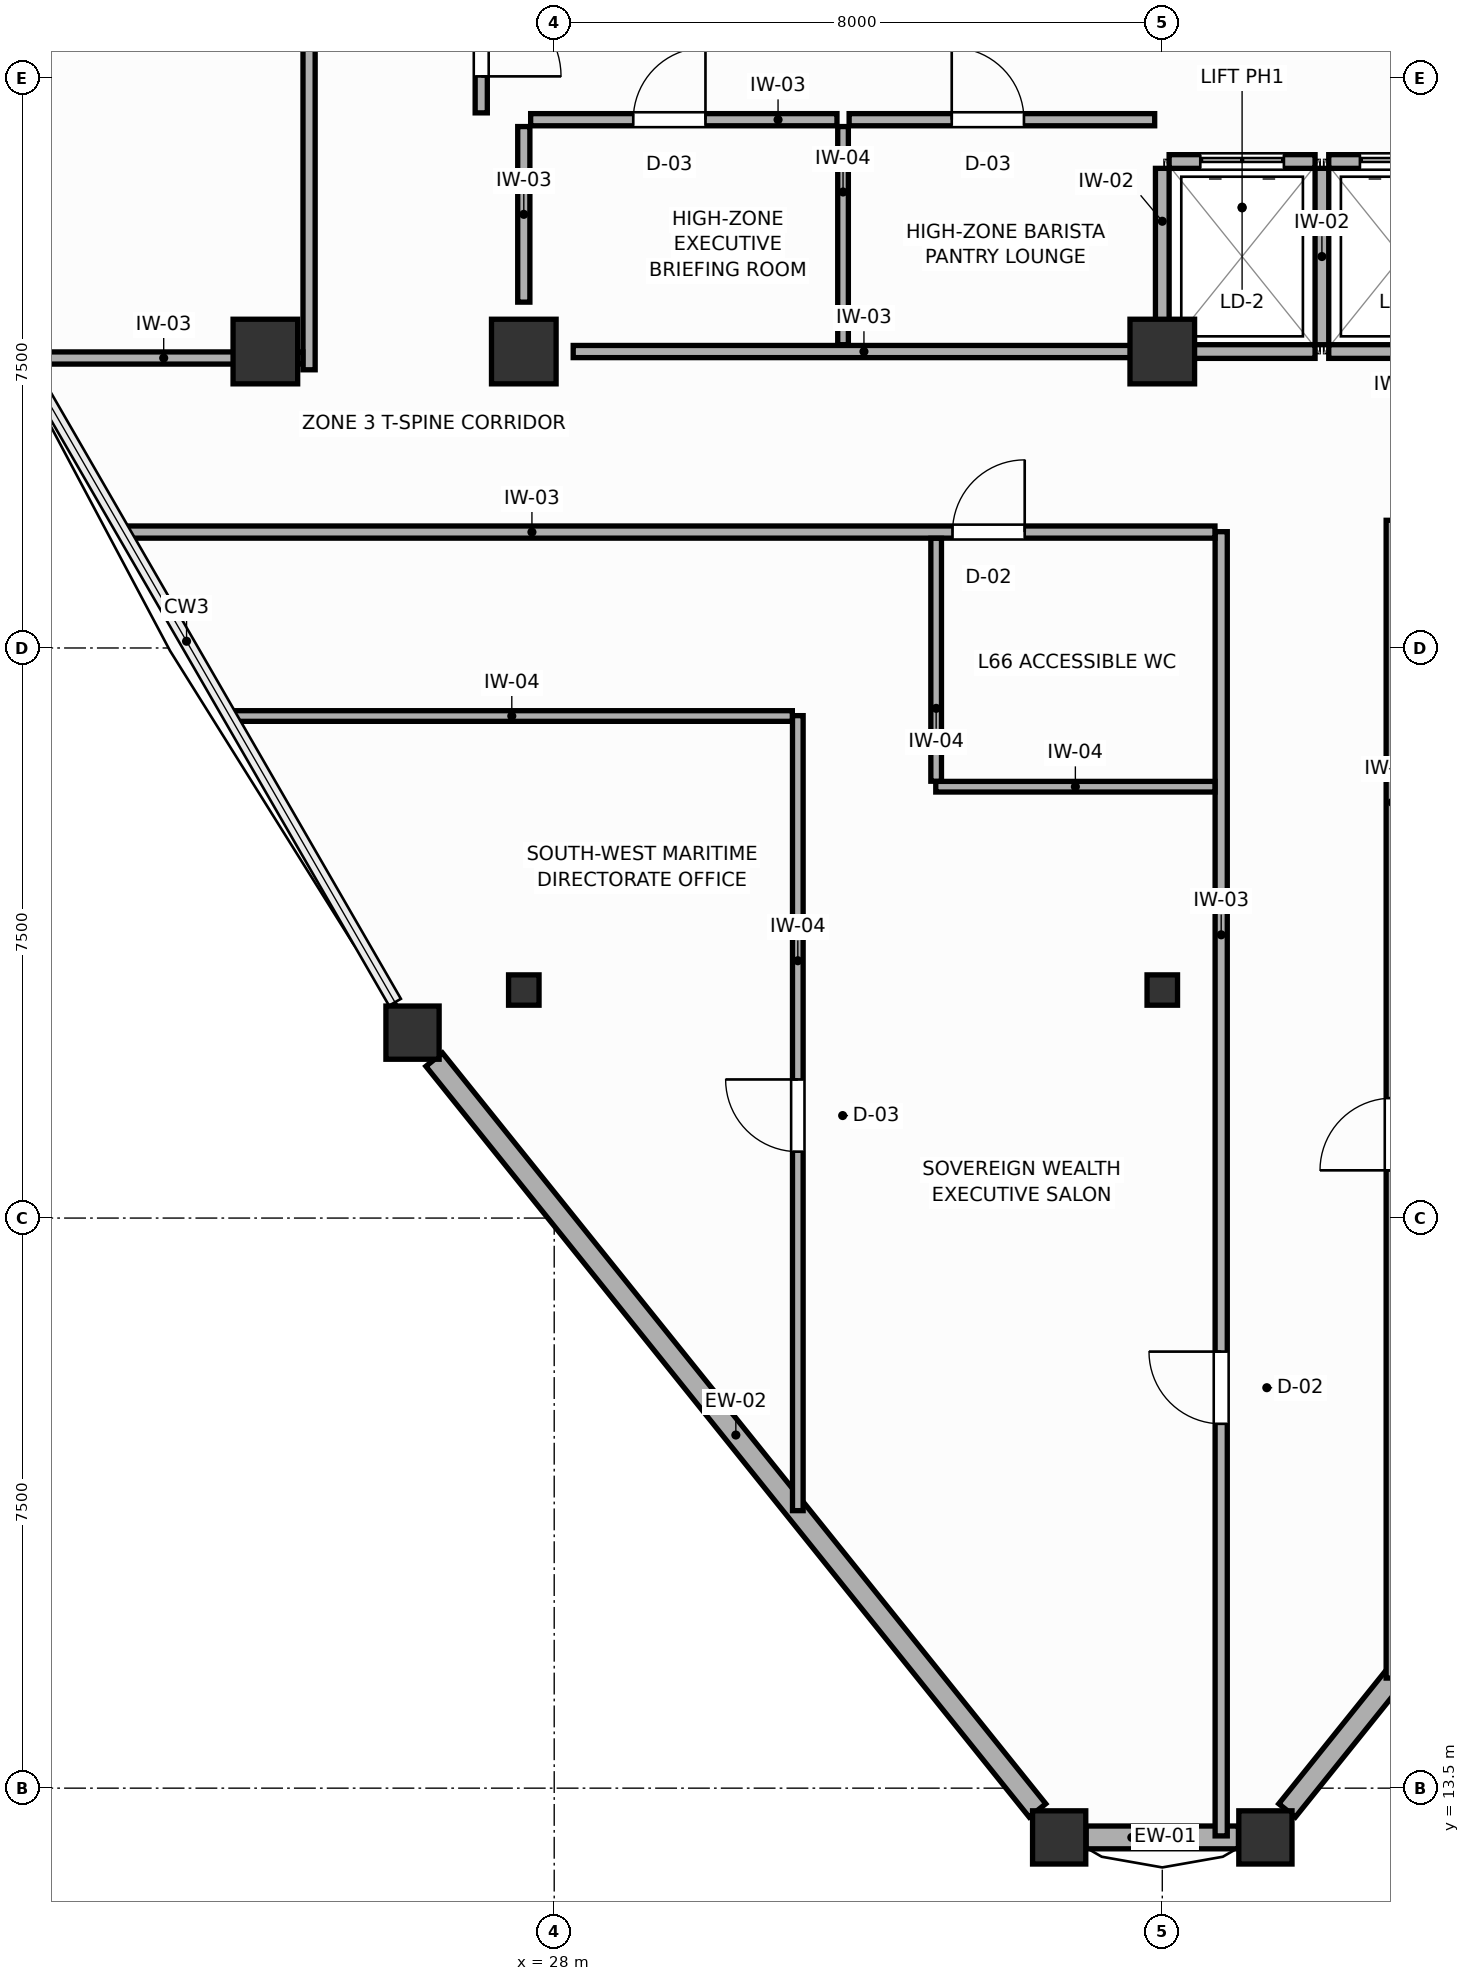
"""IFC4 building model, lengths in metres.
Left out: names, types, materials, properties, quantities, classifications, styles, units other than length and angle.
Written with IfcOpenShell. Run it as: python <this file> out.ifc"""

import sys

from ifc_helpers import new_model, si_unit, direction, frame, frame_2d, origin, origin_2d, place, context, subcontext, project, spatial, rectangle, i_section, extrude, source, transform, mapped, element, fill, save


model = new_model("IFC4")
c1 = context("Model", 3, precision=1e-05, world=origin(), true_north=direction((0.0, 1.0)))
c2 = subcontext(c1, "Body", "Model", "MODEL_VIEW")
j1 = project(units=[si_unit("LENGTHUNIT", "METRE"), si_unit("PLANEANGLEUNIT", "RADIAN")], contexts=[c1])
p1 = place(None, origin())
s1 = spatial("IfcSite", under=j1, at=p1, CompositionType="ELEMENT")
p2 = place(p1, origin())
s2 = spatial("IfcBuilding", under=s1, at=p2, CompositionType="ELEMENT")
p3 = place(p2, frame((0.0, 0.0, 253.8)))
s3 = spatial("IfcBuildingStorey", under=s2, at=p3, CompositionType="ELEMENT", Elevation=253.8)
m1 = source(origin(), c2, "Body", "SweptSolid", [
    extrude(rectangle(XDim=0.85, YDim=0.85, at=origin_2d()), origin(), (0.0, 0.0, 1.0), 3.6),
])
for number, where, z_axis, x_axis in (
    (1, (27.6, 32.4, 0.0), (0.0, 0.0, 1.0), (1.0, 0.0, 0.0)),
    (2, (36.0, 32.4, 0.0), (0.0, 0.0, 1.0), (1.0, 0.0, 0.0)),
    (3, (24.2, 32.4, 0.0), (0.0, 0.0, 1.0), (1.0, 0.0, 0.0)),
):
    element("IfcColumn", number, at=place(p3, frame(where, z_axis=z_axis, x_axis=x_axis)), inside=s3, PredefinedType="COLUMN", context=c2, shape_type="MappedRepresentation", body=[
        mapped(m1, transform((0.0, 0.0, 0.0), scale=1.0)),
    ])
m2 = source(origin(), c2, "Body", "SweptSolid", [
    extrude(i_section(OverallWidth=0.401, OverallDepth=0.399, WebThickness=0.022, FlangeThickness=0.036, FilletRadius=0.015, at=origin_2d()), origin(), (0.0, 0.0, 1.0), 3.6),
])
for number, where, z_axis, x_axis in (
    (4, (27.6, 24.0, 0.0), (0.0, 0.0, 1.0), (1.0, 0.0, 0.0)),
    (5, (36.0, 24.0, 0.0), (0.0, 0.0, 1.0), (1.0, 0.0, 0.0)),
):
    element("IfcColumn", number, at=place(p3, frame(where, z_axis=z_axis, x_axis=x_axis)), inside=s3, PredefinedType="COLUMN", context=c2, shape_type="MappedRepresentation", body=[
        mapped(m2, transform((0.0, 0.0, 0.0), scale=1.0)),
    ])
m3 = source(origin(), c2, "Body", "SweptSolid", [
    extrude(rectangle(XDim=0.7, YDim=0.7, at=origin_2d()), origin(), (0.0, 0.0, 1.0), 3.6),
])
for number, where, z_axis, x_axis in (
    (6, (26.136, 23.439, 0.0), (0.0, 0.0, 1.0), (1.0, 0.0, 0.0)),
    (7, (34.643, 12.852, 0.0), (0.0, 0.0, 1.0), (1.0, 0.0, 0.0)),
    (8, (37.357, 12.852, 0.0), (0.0, 0.0, 1.0), (1.0, 0.0, 0.0)),
):
    element("IfcColumn", number, at=place(p3, frame(where, z_axis=z_axis, x_axis=x_axis)), inside=s3, PredefinedType="COLUMN", context=c2, shape_type="MappedRepresentation", body=[
        mapped(m3, transform((0.0, 0.0, 0.0), scale=1.0)),
    ])
p4 = place(p3, frame((26.421, 23.084, 0.0), z_axis=(0.0, 0.0, 1.0), x_axis=(0.626371247501, -0.77952489396, 0.0)))
e9 = element("IfcWall", 9, at=p4, inside=s3, PredefinedType="SOLIDWALL", context=c2, shape_type="SweptSolid", body=[
    extrude(rectangle(XDim=12.671, YDim=0.28, at=frame_2d((6.336, 0.0))), origin(), (0.0, 0.0, 1.0), 1.88),
])
p5 = place(p3, frame((34.998, 12.852, 0.0), z_axis=(0.0, 0.0, 1.0), x_axis=(1.0, 0.0, 0.0)))
e10 = element("IfcWall", 10, at=p5, inside=s3, PredefinedType="SOLIDWALL", context=c2, shape_type="SweptSolid", body=[
    extrude(rectangle(XDim=2.003, YDim=0.3, at=frame_2d((1.002, 0.0))), origin(), (0.0, 0.0, 1.0), 1.88),
])
p6 = place(p3, frame((37.642, 13.207, 0.0), z_axis=(0.0, 0.0, 1.0), x_axis=(0.626371247501, 0.77952489396, 0.0)))
e11 = element("IfcWall", 11, at=p6, inside=s3, PredefinedType="SOLIDWALL", context=c2, shape_type="SweptSolid", body=[
    extrude(rectangle(XDim=12.671, YDim=0.28, at=frame_2d((6.336, 0.0))), origin(), (0.0, 0.0, 1.0), 1.88),
])
p7 = place(p3, frame((36.09, 34.9, 0.0), z_axis=(0.0, 0.0, 1.0), x_axis=(1.0, 0.0, 0.0)))
e12 = element("IfcWall", 12, at=p7, inside=s3, PredefinedType="PARTITIONING", context=c2, shape_type="SweptSolid", body=[
    extrude(rectangle(XDim=1.92, YDim=0.18, at=frame_2d((0.96, 0.0))), origin(), (0.0, 0.0, 1.0), 3.41),
])
p8 = place(p7, frame((0.41, 0.0, 0.0)))
e13 = element("IfcOpeningElement", 13, at=p8, cuts=e12, PredefinedType="OPENING", context=c2, shape_type="SweptSolid", body=[
    extrude(rectangle(XDim=1.1, YDim=2.1, at=frame_2d((0.55, 1.05))), frame((0.0, 0.1, 0.0), z_axis=(0.0, -1.0, 0.0), x_axis=(1.0, 0.0, 0.0)), (0.0, 0.0, 1.0), 0.2),
])
p9 = place(p3, frame((36.09, 32.4, 0.0), z_axis=(0.0, 0.0, 1.0), x_axis=(1.0, 0.0, 0.0)))
e14 = element("IfcWall", 14, at=p9, inside=s3, PredefinedType="PARTITIONING", context=c2, shape_type="SweptSolid", body=[
    extrude(rectangle(XDim=1.92, YDim=0.18, at=frame_2d((0.96, 0.0))), origin(), (0.0, 0.0, 1.0), 2.17),
])
p10 = place(p3, frame((36.0, 32.49, 0.0), z_axis=(0.0, 0.0, 1.0), x_axis=(0.0, 1.0, 0.0)))
e15 = element("IfcWall", 15, at=p10, inside=s3, PredefinedType="PARTITIONING", context=c2, shape_type="SweptSolid", body=[
    extrude(rectangle(XDim=2.32, YDim=0.18, at=frame_2d((1.16, 0.0))), origin(), (0.0, 0.0, 1.0), 3.41),
])
p11 = place(p3, frame((38.19, 34.9, 0.0), z_axis=(0.0, 0.0, 1.0), x_axis=(1.0, 0.0, 0.0)))
e16 = element("IfcWall", 16, at=p11, inside=s3, PredefinedType="PARTITIONING", context=c2, shape_type="SweptSolid", body=[
    extrude(rectangle(XDim=1.92, YDim=0.18, at=frame_2d((0.96, 0.0))), origin(), (0.0, 0.0, 1.0), 3.41),
])
p12 = place(p11, frame((0.41, 0.0, 0.0)))
e17 = element("IfcOpeningElement", 17, at=p12, cuts=e16, PredefinedType="OPENING", context=c2, shape_type="SweptSolid", body=[
    extrude(rectangle(XDim=1.1, YDim=2.1, at=frame_2d((0.55, 1.05))), frame((0.0, 0.1, 0.0), z_axis=(0.0, -1.0, 0.0), x_axis=(1.0, 0.0, 0.0)), (0.0, 0.0, 1.0), 0.2),
])
p13 = place(p3, frame((38.19, 32.4, 0.0), z_axis=(0.0, 0.0, 1.0), x_axis=(1.0, 0.0, 0.0)))
e18 = element("IfcWall", 18, at=p13, inside=s3, PredefinedType="PARTITIONING", context=c2, shape_type="SweptSolid", body=[
    extrude(rectangle(XDim=1.92, YDim=0.18, at=frame_2d((0.96, 0.0))), origin(), (0.0, 0.0, 1.0), 2.17),
])
p14 = place(p3, frame((38.1, 32.49, 0.0), z_axis=(0.0, 0.0, 1.0), x_axis=(0.0, 1.0, 0.0)))
e19 = element("IfcWall", 19, at=p14, inside=s3, PredefinedType="PARTITIONING", context=c2, shape_type="SweptSolid", body=[
    extrude(rectangle(XDim=2.32, YDim=0.18, at=frame_2d((1.16, 0.0))), origin(), (0.0, 0.0, 1.0), 3.41),
])
p15 = place(p3, frame((28.25, 32.4, 0.0), z_axis=(0.0, 0.0, 1.0), x_axis=(1.0, 0.0, 0.0)))
e20 = element("IfcWall", 20, at=p15, inside=s3, PredefinedType="PARTITIONING", context=c2, shape_type="SweptSolid", body=[
    extrude(rectangle(XDim=7.65, YDim=0.16, at=frame_2d((3.825, 0.0))), origin(), (0.0, 0.0, 1.0), 2.17),
])
p16 = place(p3, frame((27.6, 33.05, 0.0), z_axis=(0.0, 0.0, 1.0), x_axis=(0.0, 1.0, 0.0)))
e21 = element("IfcWall", 21, at=p16, inside=s3, PredefinedType="PARTITIONING", context=c2, shape_type="SweptSolid", body=[
    extrude(rectangle(XDim=2.31, YDim=0.16, at=frame_2d((1.155, 0.0))), origin(), (0.0, 0.0, 1.0), 3.41),
])
p17 = place(p3, frame((31.8, 32.49, 0.0), z_axis=(0.0, 0.0, 1.0), x_axis=(0.0, 1.0, 0.0)))
e22 = element("IfcWall", 22, at=p17, inside=s3, PredefinedType="PARTITIONING", context=c2, shape_type="SweptSolid", body=[
    extrude(rectangle(XDim=2.87, YDim=0.14, at=frame_2d((1.435, 0.0))), origin(), (0.0, 0.0, 1.0), 3.41),
])
p18 = place(p3, frame((27.69, 35.45, 0.0), z_axis=(0.0, 0.0, 1.0), x_axis=(1.0, 0.0, 0.0)))
e23 = element("IfcWall", 23, at=p18, inside=s3, PredefinedType="PARTITIONING", context=c2, shape_type="SweptSolid", body=[
    extrude(rectangle(XDim=4.03, YDim=0.16, at=frame_2d((2.015, 0.0))), origin(), (0.0, 0.0, 1.0), 3.41),
])
p19 = place(p18, frame((1.35, 0.0, 0.0)))
e24 = element("IfcOpeningElement", 24, at=p19, cuts=e23, PredefinedType="OPENING", context=c2, shape_type="SweptSolid", body=[
    extrude(rectangle(XDim=0.95, YDim=2.05, at=frame_2d((0.475, 1.025))), frame((0.0, 0.09, 0.0), z_axis=(0.0, -1.0, 0.0), x_axis=(1.0, 0.0, 0.0)), (0.0, 0.0, 1.0), 0.18),
])
p20 = place(p3, frame((31.88, 35.45, 0.0), z_axis=(0.0, 0.0, 1.0), x_axis=(1.0, 0.0, 0.0)))
e25 = element("IfcWall", 25, at=p20, inside=s3, PredefinedType="PARTITIONING", context=c2, shape_type="SweptSolid", body=[
    extrude(rectangle(XDim=4.02, YDim=0.16, at=frame_2d((2.01, 0.0))), origin(), (0.0, 0.0, 1.0), 3.41),
])
p21 = place(p20, frame((1.35, 0.0, 0.0)))
e26 = element("IfcOpeningElement", 26, at=p21, cuts=e25, PredefinedType="OPENING", context=c2, shape_type="SweptSolid", body=[
    extrude(rectangle(XDim=0.95, YDim=2.05, at=frame_2d((0.475, 1.025))), frame((0.0, 0.09, 0.0), z_axis=(0.0, -1.0, 0.0), x_axis=(1.0, 0.0, 0.0)), (0.0, 0.0, 1.0), 0.18),
])
p22 = place(p3, frame((27.04, 35.54, 0.0), z_axis=(0.0, 0.0, 1.0), x_axis=(0.0, 1.0, 0.0)))
e27 = element("IfcWall", 27, at=p22, inside=s3, PredefinedType="PARTITIONING", context=c2, shape_type="SweptSolid", body=[
    extrude(rectangle(XDim=2.11, YDim=0.16, at=frame_2d((1.055, 0.0))), origin(), (0.0, 0.0, 1.0), 3.41),
])
p23 = place(p22, frame((0.48, 0.0, 0.0)))
e28 = element("IfcOpeningElement", 28, at=p23, cuts=e27, PredefinedType="OPENING", context=c2, shape_type="SweptSolid", body=[
    extrude(rectangle(XDim=1.05, YDim=2.1, at=frame_2d((0.525, 1.05))), frame((0.0, 0.09, 0.0), z_axis=(0.0, -1.0, 0.0), x_axis=(1.0, 0.0, 0.0)), (0.0, 0.0, 1.0), 0.18),
])
p24 = place(p3, frame((24.775, 32.16, 0.0), z_axis=(0.0, 0.0, 1.0), x_axis=(0.0, 1.0, 0.0)))
e29 = element("IfcWall", 29, at=p24, inside=s3, PredefinedType="PARTITIONING", context=c2, shape_type="SweptSolid", body=[
    extrude(rectangle(XDim=17.827, YDim=0.16, at=frame_2d((8.914, 0.0))), origin(), (0.0, 0.0, 1.0), 3.41),
])
p25 = place(p24, frame((8.33, 0.0, 0.0)))
e30 = element("IfcOpeningElement", 30, at=p25, cuts=e29, PredefinedType="OPENING", context=c2, shape_type="SweptSolid", body=[
    extrude(rectangle(XDim=0.95, YDim=2.05, at=frame_2d((0.475, 1.025))), frame((0.0, 0.09, 0.0), z_axis=(0.0, -1.0, 0.0), x_axis=(1.0, 0.0, 0.0)), (0.0, 0.0, 1.0), 0.18),
])
p26 = place(p3, frame((36.775, 12.872, 0.0), z_axis=(0.0, 0.0, 1.0), x_axis=(0.0, 1.0, 0.0)))
e31 = element("IfcWall", 31, at=p26, inside=s3, PredefinedType="PARTITIONING", context=c2, shape_type="SweptSolid", body=[
    extrude(rectangle(XDim=17.158, YDim=0.16, at=frame_2d((8.579, 0.0))), origin(), (0.0, 0.0, 1.0), 3.41),
])
p27 = place(p26, frame((5.421, 0.0, 0.0)))
e32 = element("IfcOpeningElement", 32, at=p27, cuts=e31, PredefinedType="OPENING", context=c2, shape_type="SweptSolid", body=[
    extrude(rectangle(XDim=0.95, YDim=2.05, at=frame_2d((0.475, 1.025))), frame((0.0, 0.09, 0.0), z_axis=(0.0, -1.0, 0.0), x_axis=(1.0, 0.0, 0.0)), (0.0, 0.0, 1.0), 0.18),
])
p28 = place(p3, frame((39.025, 14.948, 0.0), z_axis=(0.0, 0.0, 1.0), x_axis=(0.0, 1.0, 0.0)))
e33 = element("IfcWall", 33, at=p28, inside=s3, PredefinedType="PARTITIONING", context=c2, shape_type="SweptSolid", body=[
    extrude(rectangle(XDim=15.232, YDim=0.16, at=frame_2d((7.616, 0.0))), origin(), (0.0, 0.0, 1.0), 3.41),
])
p29 = place(p28, frame((6.68, 0.0, 0.0)))
e34 = element("IfcOpeningElement", 34, at=p29, cuts=e33, PredefinedType="OPENING", context=c2, shape_type="SweptSolid", body=[
    extrude(rectangle(XDim=0.95, YDim=2.05, at=frame_2d((0.475, 1.025))), frame((0.0, 0.09, 0.0), z_axis=(0.0, -1.0, 0.0), x_axis=(1.0, 0.0, 0.0)), (0.0, 0.0, 1.0), 0.18),
])
p30 = place(p3, frame((22.354, 30.025, 0.0), z_axis=(0.0, 0.0, 1.0), x_axis=(1.0, 0.0, 0.0)))
e35 = element("IfcWall", 35, at=p30, inside=s3, PredefinedType="PARTITIONING", context=c2, shape_type="SweptSolid", body=[
    extrude(rectangle(XDim=14.339, YDim=0.16, at=frame_2d((7.169, 0.0))), origin(), (0.0, 0.0, 1.0), 3.41),
])
p31 = place(p30, frame((10.886, 0.0, 0.0)))
e36 = element("IfcOpeningElement", 36, at=p31, cuts=e35, PredefinedType="OPENING", context=c2, shape_type="SweptSolid", body=[
    extrude(rectangle(XDim=0.95, YDim=2.05, at=frame_2d((0.475, 1.025))), frame((0.0, 0.09, 0.0), z_axis=(0.0, -1.0, 0.0), x_axis=(1.0, 0.0, 0.0)), (0.0, 0.0, 1.0), 0.18),
])
p32 = place(p3, frame((21.032, 32.315, 0.0), z_axis=(0.0, 0.0, 1.0), x_axis=(1.0, 0.0, 0.0)))
e37 = element("IfcWall", 37, at=p32, inside=s3, PredefinedType="PARTITIONING", context=c2, shape_type="SweptSolid", body=[
    extrude(rectangle(XDim=3.661, YDim=0.16, at=frame_2d((1.831, 0.0))), origin(), (0.0, 0.0, 1.0), 2.17),
])
p33 = place(p3, frame((31.205, 17.151, 0.0), z_axis=(0.0, 0.0, 1.0), x_axis=(0.0, 1.0, 0.0)))
e38 = element("IfcWall", 38, at=p33, inside=s3, PredefinedType="PARTITIONING", context=c2, shape_type="SweptSolid", body=[
    extrude(rectangle(XDim=10.459, YDim=0.14, at=frame_2d((5.229, 0.0))), origin(), (0.0, 0.0, 1.0), 3.41),
])
p34 = place(p33, frame((4.723, 0.0, 0.0)))
e39 = element("IfcOpeningElement", 39, at=p34, cuts=e38, PredefinedType="OPENING", context=c2, shape_type="SweptSolid", body=[
    extrude(rectangle(XDim=0.95, YDim=2.05, at=frame_2d((0.475, 1.025))), frame((0.0, 0.08, 0.0), z_axis=(0.0, -1.0, 0.0), x_axis=(1.0, 0.0, 0.0)), (0.0, 0.0, 1.0), 0.16),
])
p35 = place(p3, frame((23.751, 27.605, 0.0), z_axis=(0.0, 0.0, 1.0), x_axis=(1.0, 0.0, 0.0)))
e40 = element("IfcWall", 40, at=p35, inside=s3, PredefinedType="PARTITIONING", context=c2, shape_type="SweptSolid", body=[
    extrude(rectangle(XDim=7.382, YDim=0.14, at=frame_2d((3.691, 0.0))), origin(), (0.0, 0.0, 1.0), 3.41),
])
p36 = place(p3, frame((33.02, 26.675, 0.0), z_axis=(0.0, 0.0, 1.0), x_axis=(1.0, 0.0, 0.0)))
e41 = element("IfcWall", 41, at=p36, inside=s3, PredefinedType="PARTITIONING", context=c2, shape_type="SweptSolid", body=[
    extrude(rectangle(XDim=3.673, YDim=0.14, at=frame_2d((1.836, 0.0))), origin(), (0.0, 0.0, 1.0), 3.41),
])
p37 = place(p3, frame((33.025, 26.747, 0.0), z_axis=(0.0, 0.0, 1.0), x_axis=(0.0, 1.0, 0.0)))
e42 = element("IfcWall", 42, at=p37, inside=s3, PredefinedType="PARTITIONING", context=c2, shape_type="SweptSolid", body=[
    extrude(rectangle(XDim=3.196, YDim=0.14, at=frame_2d((1.598, 0.0))), origin(), (0.0, 0.0, 1.0), 3.41),
])
p38 = place(p8, origin())
e43 = element("IfcDoor", 43, at=p38, inside=s3, OperationType="DOUBLE_DOOR_SLIDING", PredefinedType="DOOR", context=c2, shape_type="SweptSolid", body=[
    extrude(rectangle(XDim=1.1, YDim=2.1, at=frame_2d((0.55, 1.05))), frame((0.0, 0.025, 0.0), z_axis=(0.0, -1.0, 0.0), x_axis=(1.0, 0.0, 0.0)), (0.0, 0.0, 1.0), 0.05),
])
fill(e13, e43)
p39 = place(p12, origin())
e44 = element("IfcDoor", 44, at=p39, inside=s3, OperationType="DOUBLE_DOOR_SLIDING", PredefinedType="DOOR", context=c2, shape_type="SweptSolid", body=[
    extrude(rectangle(XDim=1.1, YDim=2.1, at=frame_2d((0.55, 1.05))), frame((0.0, 0.025, 0.0), z_axis=(0.0, -1.0, 0.0), x_axis=(1.0, 0.0, 0.0)), (0.0, 0.0, 1.0), 0.05),
])
fill(e17, e44)
p40 = place(p19, origin())
e45 = element("IfcDoor", 45, at=p40, inside=s3, OperationType="SINGLE_SWING_RIGHT", PredefinedType="DOOR", context=c2, shape_type="SweptSolid", body=[
    extrude(rectangle(XDim=0.95, YDim=2.05, at=frame_2d((0.475, 1.025))), frame((0.0, 0.025, 0.0), z_axis=(0.0, -1.0, 0.0), x_axis=(1.0, 0.0, 0.0)), (0.0, 0.0, 1.0), 0.05),
])
fill(e24, e45)
p41 = place(p21, origin())
e46 = element("IfcDoor", 46, at=p41, inside=s3, OperationType="SINGLE_SWING_LEFT", PredefinedType="DOOR", context=c2, shape_type="SweptSolid", body=[
    extrude(rectangle(XDim=0.95, YDim=2.05, at=frame_2d((0.475, 1.025))), frame((0.0, 0.025, 0.0), z_axis=(0.0, -1.0, 0.0), x_axis=(1.0, 0.0, 0.0)), (0.0, 0.0, 1.0), 0.05),
])
fill(e26, e46)
p42 = place(p23, frame((1.05, 0.0, 0.0), z_axis=(0.0, 0.0, 1.0), x_axis=(-1.0, 0.0, 0.0)))
e47 = element("IfcDoor", 47, at=p42, inside=s3, OperationType="SINGLE_SWING_RIGHT", PredefinedType="DOOR", context=c2, shape_type="SweptSolid", body=[
    extrude(rectangle(XDim=1.05, YDim=2.1, at=frame_2d((0.525, 1.05))), frame((0.0, 0.025, 0.0), z_axis=(0.0, -1.0, 0.0), x_axis=(1.0, 0.0, 0.0)), (0.0, 0.0, 1.0), 0.05),
])
fill(e28, e47)
p43 = place(p27, origin())
e48 = element("IfcDoor", 48, at=p43, inside=s3, OperationType="SINGLE_SWING_RIGHT", PredefinedType="DOOR", context=c2, shape_type="SweptSolid", body=[
    extrude(rectangle(XDim=0.95, YDim=2.05, at=frame_2d((0.475, 1.025))), frame((0.0, 0.025, 0.0), z_axis=(0.0, -1.0, 0.0), x_axis=(1.0, 0.0, 0.0)), (0.0, 0.0, 1.0), 0.05),
])
fill(e32, e48)
p44 = place(p29, origin())
e49 = element("IfcDoor", 49, at=p44, inside=s3, OperationType="SINGLE_SWING_LEFT", PredefinedType="DOOR", context=c2, shape_type="SweptSolid", body=[
    extrude(rectangle(XDim=0.95, YDim=2.05, at=frame_2d((0.475, 1.025))), frame((0.0, 0.025, 0.0), z_axis=(0.0, -1.0, 0.0), x_axis=(1.0, 0.0, 0.0)), (0.0, 0.0, 1.0), 0.05),
])
fill(e34, e49)
p45 = place(p31, origin())
e50 = element("IfcDoor", 50, at=p45, inside=s3, OperationType="SINGLE_SWING_RIGHT", PredefinedType="DOOR", context=c2, shape_type="SweptSolid", body=[
    extrude(rectangle(XDim=0.95, YDim=2.05, at=frame_2d((0.475, 1.025))), frame((0.0, 0.025, 0.0), z_axis=(0.0, -1.0, 0.0), x_axis=(1.0, 0.0, 0.0)), (0.0, 0.0, 1.0), 0.05),
])
fill(e36, e50)
p46 = place(p34, origin())
e51 = element("IfcDoor", 51, at=p46, inside=s3, OperationType="SINGLE_SWING_RIGHT", PredefinedType="DOOR", context=c2, shape_type="SweptSolid", body=[
    extrude(rectangle(XDim=0.95, YDim=2.05, at=frame_2d((0.475, 1.025))), frame((0.0, 0.025, 0.0), z_axis=(0.0, -1.0, 0.0), x_axis=(1.0, 0.0, 0.0)), (0.0, 0.0, 1.0), 0.05),
])
fill(e39, e51)
save(model, sys.argv[1])
